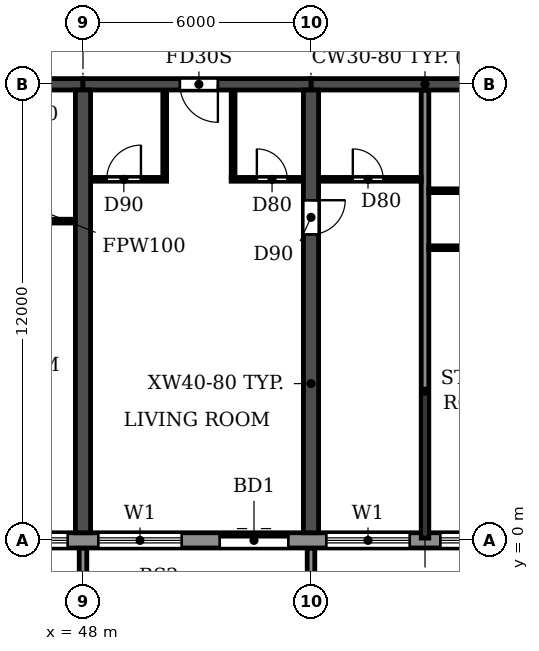
"""IFC4 building model, lengths in metres.
Left out: names, types, materials, properties, quantities, classifications, styles, units other than length and angle.
Written with IfcOpenShell. Run it as: python <this file> out.ifc"""

import sys

from ifc_helpers import new_model, si_unit, direction, frame, frame_2d, origin, place, context, subcontext, project, spatial, polyline, rectangle, outline, extrude, source, transform, mapped, element, fill, save


model = new_model("IFC4")
c1 = context("Model", 3, precision=1e-05, world=origin(), true_north=direction((0.0, 1.0)))
c2 = subcontext(c1, "Body", "Model", "MODEL_VIEW")
j1 = project(units=[si_unit("LENGTHUNIT", "METRE"), si_unit("PLANEANGLEUNIT", "RADIAN")], contexts=[c1])
p1 = place(None, origin())
s1 = spatial("IfcSite", under=j1, at=p1, CompositionType="ELEMENT")
p2 = place(p1, origin())
s2 = spatial("IfcBuilding", under=s1, at=p2, CompositionType="ELEMENT")
p3 = place(p2, frame((0.0, 0.0, 49.8)))
s3 = spatial("IfcBuildingStorey", under=s2, at=p3, CompositionType="ELEMENT", Elevation=49.8)
p4 = place(p3, frame((48.0, 0.2, 0.0), z_axis=(0.0, 0.0, 1.0), x_axis=(0.0, 1.0, 0.0)))
e1 = element("IfcWall", 1, at=p4, inside=s3, PredefinedType="SHEAR", context=c2, shape_type="SweptSolid", body=[
    extrude(rectangle(XDim=11.65, YDim=0.4, at=frame_2d((5.825, 0.0))), origin(), (0.0, 0.0, 1.0), 3.0),
])
p5 = place(p3, frame((54.0, 0.2, 0.0), z_axis=(0.0, 0.0, 1.0), x_axis=(0.0, 1.0, 0.0)))
e2 = element("IfcWall", 2, at=p5, inside=s3, PredefinedType="SHEAR", context=c2, shape_type="SweptSolid", body=[
    extrude(rectangle(XDim=11.65, YDim=0.4, at=frame_2d((5.825, 0.0))), origin(), (0.0, 0.0, 1.0), 3.0),
])
p6 = place(p5, frame((7.85, 0.0, 0.0)))
e3 = element("IfcOpeningElement", 3, at=p6, cuts=e2, PredefinedType="OPENING", context=c2, shape_type="SweptSolid", body=[
    extrude(rectangle(XDim=0.9, YDim=2.1, at=frame_2d((0.45, 1.05))), frame((0.0, 0.21, 0.0), z_axis=(0.0, -1.0, 0.0), x_axis=(1.0, 0.0, 0.0)), (0.0, 0.0, 1.0), 0.42),
])
p7 = place(p3, frame((42.0, 12.0, 0.0), z_axis=(0.0, 0.0, 1.0), x_axis=(1.0, 0.0, 0.0)))
e4 = element("IfcWall", 4, at=p7, inside=s3, PredefinedType="SHEAR", context=c2, shape_type="SweptSolid", body=[
    extrude(rectangle(XDim=6.0, YDim=0.3, at=frame_2d((3.0, 0.0))), origin(), (0.0, 0.0, 1.0), 2.4),
])
p8 = place(p7, frame((2.45, 0.0, 0.0)))
e5 = element("IfcOpeningElement", 5, at=p8, cuts=e4, PredefinedType="OPENING", context=c2, shape_type="SweptSolid", body=[
    extrude(rectangle(XDim=1.0, YDim=2.1, at=frame_2d((0.5, 1.05))), frame((0.0, 0.16, 0.0), z_axis=(0.0, -1.0, 0.0), x_axis=(1.0, 0.0, 0.0)), (0.0, 0.0, 1.0), 0.32),
])
p9 = place(p3, frame((48.0, 12.0, 0.0), z_axis=(0.0, 0.0, 1.0), x_axis=(1.0, 0.0, 0.0)))
e6 = element("IfcWall", 6, at=p9, inside=s3, PredefinedType="SHEAR", context=c2, shape_type="SweptSolid", body=[
    extrude(rectangle(XDim=6.0, YDim=0.3, at=frame_2d((3.0, 0.0))), origin(), (0.0, 0.0, 1.0), 2.4),
])
p10 = place(p9, frame((2.55, 0.0, 0.0)))
e7 = element("IfcOpeningElement", 7, at=p10, cuts=e6, PredefinedType="OPENING", context=c2, shape_type="SweptSolid", body=[
    extrude(rectangle(XDim=1.0, YDim=2.1, at=frame_2d((0.5, 1.05))), frame((0.0, 0.16, 0.0), z_axis=(0.0, -1.0, 0.0), x_axis=(1.0, 0.0, 0.0)), (0.0, 0.0, 1.0), 0.32),
])
p11 = place(p3, frame((54.0, 12.0, 0.0), z_axis=(0.0, 0.0, 1.0), x_axis=(1.0, 0.0, 0.0)))
e8 = element("IfcWall", 8, at=p11, inside=s3, PredefinedType="SHEAR", context=c2, shape_type="SweptSolid", body=[
    extrude(rectangle(XDim=6.0, YDim=0.3, at=frame_2d((3.0, 0.0))), origin(), (0.0, 0.0, 1.0), 2.4),
])
p12 = place(p3, frame((4.683, 0.0, 0.0), z_axis=(0.0, 0.0, 1.0), x_axis=(1.0, 0.0, 0.0)))
e9 = element("IfcWall", 9, at=p12, inside=s3, PredefinedType="STANDARD", context=c2, shape_type="SweptSolid", body=[
    extrude(rectangle(XDim=92.634, YDim=0.4, at=frame_2d((46.317, 0.0))), origin(), (0.0, 0.0, 1.0), 3.0),
])
p13 = place(p12, frame((1.717, 0.0, 0.9)))
e10 = element("IfcOpeningElement", 10, at=p13, cuts=e9, PredefinedType="OPENING", context=c2, shape_type="SweptSolid", body=[
    extrude(rectangle(XDim=2.2, YDim=1.5, at=frame_2d((1.1, 0.75))), frame((0.0, 0.21, 0.0), z_axis=(0.0, -1.0, 0.0), x_axis=(1.0, 0.0, 0.0)), (0.0, 0.0, 1.0), 0.42),
])
p14 = place(p12, frame((4.717, 0.0, 0.9)))
e11 = element("IfcOpeningElement", 11, at=p14, cuts=e9, PredefinedType="OPENING", context=c2, shape_type="SweptSolid", body=[
    extrude(rectangle(XDim=2.2, YDim=1.5, at=frame_2d((1.1, 0.75))), frame((0.0, 0.21, 0.0), z_axis=(0.0, -1.0, 0.0), x_axis=(1.0, 0.0, 0.0)), (0.0, 0.0, 1.0), 0.42),
])
p15 = place(p12, frame((7.717, 0.0, 0.9)))
e12 = element("IfcOpeningElement", 12, at=p15, cuts=e9, PredefinedType="OPENING", context=c2, shape_type="SweptSolid", body=[
    extrude(rectangle(XDim=2.2, YDim=1.5, at=frame_2d((1.1, 0.75))), frame((0.0, 0.21, 0.0), z_axis=(0.0, -1.0, 0.0), x_axis=(1.0, 0.0, 0.0)), (0.0, 0.0, 1.0), 0.42),
])
p16 = place(p12, frame((10.917, 0.0, 0.0)))
e13 = element("IfcOpeningElement", 13, at=p16, cuts=e9, PredefinedType="OPENING", context=c2, shape_type="SweptSolid", body=[
    extrude(rectangle(XDim=1.8, YDim=2.4, at=frame_2d((0.9, 1.2))), frame((0.0, 0.21, 0.0), z_axis=(0.0, -1.0, 0.0), x_axis=(1.0, 0.0, 0.0)), (0.0, 0.0, 1.0), 0.42),
])
p17 = place(p12, frame((13.717, 0.0, 0.9)))
e14 = element("IfcOpeningElement", 14, at=p17, cuts=e9, PredefinedType="OPENING", context=c2, shape_type="SweptSolid", body=[
    extrude(rectangle(XDim=2.2, YDim=1.5, at=frame_2d((1.1, 0.75))), frame((0.0, 0.21, 0.0), z_axis=(0.0, -1.0, 0.0), x_axis=(1.0, 0.0, 0.0)), (0.0, 0.0, 1.0), 0.42),
])
p18 = place(p12, frame((16.717, 0.0, 0.9)))
e15 = element("IfcOpeningElement", 15, at=p18, cuts=e9, PredefinedType="OPENING", context=c2, shape_type="SweptSolid", body=[
    extrude(rectangle(XDim=2.2, YDim=1.5, at=frame_2d((1.1, 0.75))), frame((0.0, 0.21, 0.0), z_axis=(0.0, -1.0, 0.0), x_axis=(1.0, 0.0, 0.0)), (0.0, 0.0, 1.0), 0.42),
])
p19 = place(p12, frame((19.917, 0.0, 0.0)))
e16 = element("IfcOpeningElement", 16, at=p19, cuts=e9, PredefinedType="OPENING", context=c2, shape_type="SweptSolid", body=[
    extrude(rectangle(XDim=1.8, YDim=2.4, at=frame_2d((0.9, 1.2))), frame((0.0, 0.21, 0.0), z_axis=(0.0, -1.0, 0.0), x_axis=(1.0, 0.0, 0.0)), (0.0, 0.0, 1.0), 0.42),
])
p20 = place(p12, frame((22.717, 0.0, 0.9)))
e17 = element("IfcOpeningElement", 17, at=p20, cuts=e9, PredefinedType="OPENING", context=c2, shape_type="SweptSolid", body=[
    extrude(rectangle(XDim=2.2, YDim=1.5, at=frame_2d((1.1, 0.75))), frame((0.0, 0.21, 0.0), z_axis=(0.0, -1.0, 0.0), x_axis=(1.0, 0.0, 0.0)), (0.0, 0.0, 1.0), 0.42),
])
p21 = place(p12, frame((25.717, 0.0, 0.9)))
e18 = element("IfcOpeningElement", 18, at=p21, cuts=e9, PredefinedType="OPENING", context=c2, shape_type="SweptSolid", body=[
    extrude(rectangle(XDim=2.2, YDim=1.5, at=frame_2d((1.1, 0.75))), frame((0.0, 0.21, 0.0), z_axis=(0.0, -1.0, 0.0), x_axis=(1.0, 0.0, 0.0)), (0.0, 0.0, 1.0), 0.42),
])
p22 = place(p12, frame((28.717, 0.0, 0.9)))
e19 = element("IfcOpeningElement", 19, at=p22, cuts=e9, PredefinedType="OPENING", context=c2, shape_type="SweptSolid", body=[
    extrude(rectangle(XDim=2.2, YDim=1.5, at=frame_2d((1.1, 0.75))), frame((0.0, 0.21, 0.0), z_axis=(0.0, -1.0, 0.0), x_axis=(1.0, 0.0, 0.0)), (0.0, 0.0, 1.0), 0.42),
])
p23 = place(p12, frame((31.717, 0.0, 0.9)))
e20 = element("IfcOpeningElement", 20, at=p23, cuts=e9, PredefinedType="OPENING", context=c2, shape_type="SweptSolid", body=[
    extrude(rectangle(XDim=2.2, YDim=1.5, at=frame_2d((1.1, 0.75))), frame((0.0, 0.21, 0.0), z_axis=(0.0, -1.0, 0.0), x_axis=(1.0, 0.0, 0.0)), (0.0, 0.0, 1.0), 0.42),
])
p24 = place(p12, frame((34.917, 0.0, 0.0)))
e21 = element("IfcOpeningElement", 21, at=p24, cuts=e9, PredefinedType="OPENING", context=c2, shape_type="SweptSolid", body=[
    extrude(rectangle(XDim=1.8, YDim=2.4, at=frame_2d((0.9, 1.2))), frame((0.0, 0.21, 0.0), z_axis=(0.0, -1.0, 0.0), x_axis=(1.0, 0.0, 0.0)), (0.0, 0.0, 1.0), 0.42),
])
p25 = place(p12, frame((37.717, 0.0, 0.9)))
e22 = element("IfcOpeningElement", 22, at=p25, cuts=e9, PredefinedType="OPENING", context=c2, shape_type="SweptSolid", body=[
    extrude(rectangle(XDim=2.2, YDim=1.5, at=frame_2d((1.1, 0.75))), frame((0.0, 0.21, 0.0), z_axis=(0.0, -1.0, 0.0), x_axis=(1.0, 0.0, 0.0)), (0.0, 0.0, 1.0), 0.42),
])
p26 = place(p12, frame((40.717, 0.0, 0.9)))
e23 = element("IfcOpeningElement", 23, at=p26, cuts=e9, PredefinedType="OPENING", context=c2, shape_type="SweptSolid", body=[
    extrude(rectangle(XDim=2.2, YDim=1.5, at=frame_2d((1.1, 0.75))), frame((0.0, 0.21, 0.0), z_axis=(0.0, -1.0, 0.0), x_axis=(1.0, 0.0, 0.0)), (0.0, 0.0, 1.0), 0.42),
])
p27 = place(p12, frame((43.717, 0.0, 0.9)))
e24 = element("IfcOpeningElement", 24, at=p27, cuts=e9, PredefinedType="OPENING", context=c2, shape_type="SweptSolid", body=[
    extrude(rectangle(XDim=2.2, YDim=1.5, at=frame_2d((1.1, 0.75))), frame((0.0, 0.21, 0.0), z_axis=(0.0, -1.0, 0.0), x_axis=(1.0, 0.0, 0.0)), (0.0, 0.0, 1.0), 0.42),
])
p28 = place(p12, frame((46.917, 0.0, 0.0)))
e25 = element("IfcOpeningElement", 25, at=p28, cuts=e9, PredefinedType="OPENING", context=c2, shape_type="SweptSolid", body=[
    extrude(rectangle(XDim=1.8, YDim=2.4, at=frame_2d((0.9, 1.2))), frame((0.0, 0.21, 0.0), z_axis=(0.0, -1.0, 0.0), x_axis=(1.0, 0.0, 0.0)), (0.0, 0.0, 1.0), 0.42),
])
p29 = place(p12, frame((49.717, 0.0, 0.9)))
e26 = element("IfcOpeningElement", 26, at=p29, cuts=e9, PredefinedType="OPENING", context=c2, shape_type="SweptSolid", body=[
    extrude(rectangle(XDim=2.2, YDim=1.5, at=frame_2d((1.1, 0.75))), frame((0.0, 0.21, 0.0), z_axis=(0.0, -1.0, 0.0), x_axis=(1.0, 0.0, 0.0)), (0.0, 0.0, 1.0), 0.42),
])
p30 = place(p12, frame((52.717, 0.0, 0.9)))
e27 = element("IfcOpeningElement", 27, at=p30, cuts=e9, PredefinedType="OPENING", context=c2, shape_type="SweptSolid", body=[
    extrude(rectangle(XDim=2.2, YDim=1.5, at=frame_2d((1.1, 0.75))), frame((0.0, 0.21, 0.0), z_axis=(0.0, -1.0, 0.0), x_axis=(1.0, 0.0, 0.0)), (0.0, 0.0, 1.0), 0.42),
])
p31 = place(p12, frame((55.717, 0.0, 0.9)))
e28 = element("IfcOpeningElement", 28, at=p31, cuts=e9, PredefinedType="OPENING", context=c2, shape_type="SweptSolid", body=[
    extrude(rectangle(XDim=2.2, YDim=1.5, at=frame_2d((1.1, 0.75))), frame((0.0, 0.21, 0.0), z_axis=(0.0, -1.0, 0.0), x_axis=(1.0, 0.0, 0.0)), (0.0, 0.0, 1.0), 0.42),
])
p32 = place(p12, frame((58.917, 0.0, 0.0)))
e29 = element("IfcOpeningElement", 29, at=p32, cuts=e9, PredefinedType="OPENING", context=c2, shape_type="SweptSolid", body=[
    extrude(rectangle(XDim=1.8, YDim=2.4, at=frame_2d((0.9, 1.2))), frame((0.0, 0.21, 0.0), z_axis=(0.0, -1.0, 0.0), x_axis=(1.0, 0.0, 0.0)), (0.0, 0.0, 1.0), 0.42),
])
p33 = place(p12, frame((61.717, 0.0, 0.9)))
e30 = element("IfcOpeningElement", 30, at=p33, cuts=e9, PredefinedType="OPENING", context=c2, shape_type="SweptSolid", body=[
    extrude(rectangle(XDim=2.2, YDim=1.5, at=frame_2d((1.1, 0.75))), frame((0.0, 0.21, 0.0), z_axis=(0.0, -1.0, 0.0), x_axis=(1.0, 0.0, 0.0)), (0.0, 0.0, 1.0), 0.42),
])
p34 = place(p12, frame((64.717, 0.0, 0.9)))
e31 = element("IfcOpeningElement", 31, at=p34, cuts=e9, PredefinedType="OPENING", context=c2, shape_type="SweptSolid", body=[
    extrude(rectangle(XDim=2.2, YDim=1.5, at=frame_2d((1.1, 0.75))), frame((0.0, 0.21, 0.0), z_axis=(0.0, -1.0, 0.0), x_axis=(1.0, 0.0, 0.0)), (0.0, 0.0, 1.0), 0.42),
])
p35 = place(p12, frame((67.717, 0.0, 0.9)))
e32 = element("IfcOpeningElement", 32, at=p35, cuts=e9, PredefinedType="OPENING", context=c2, shape_type="SweptSolid", body=[
    extrude(rectangle(XDim=2.2, YDim=1.5, at=frame_2d((1.1, 0.75))), frame((0.0, 0.21, 0.0), z_axis=(0.0, -1.0, 0.0), x_axis=(1.0, 0.0, 0.0)), (0.0, 0.0, 1.0), 0.42),
])
p36 = place(p12, frame((70.917, 0.0, 0.0)))
e33 = element("IfcOpeningElement", 33, at=p36, cuts=e9, PredefinedType="OPENING", context=c2, shape_type="SweptSolid", body=[
    extrude(rectangle(XDim=1.8, YDim=2.4, at=frame_2d((0.9, 1.2))), frame((0.0, 0.21, 0.0), z_axis=(0.0, -1.0, 0.0), x_axis=(1.0, 0.0, 0.0)), (0.0, 0.0, 1.0), 0.42),
])
p37 = place(p12, frame((73.717, 0.0, 0.9)))
e34 = element("IfcOpeningElement", 34, at=p37, cuts=e9, PredefinedType="OPENING", context=c2, shape_type="SweptSolid", body=[
    extrude(rectangle(XDim=2.2, YDim=1.5, at=frame_2d((1.1, 0.75))), frame((0.0, 0.21, 0.0), z_axis=(0.0, -1.0, 0.0), x_axis=(1.0, 0.0, 0.0)), (0.0, 0.0, 1.0), 0.42),
])
p38 = place(p12, frame((76.717, 0.0, 0.9)))
e35 = element("IfcOpeningElement", 35, at=p38, cuts=e9, PredefinedType="OPENING", context=c2, shape_type="SweptSolid", body=[
    extrude(rectangle(XDim=2.2, YDim=1.5, at=frame_2d((1.1, 0.75))), frame((0.0, 0.21, 0.0), z_axis=(0.0, -1.0, 0.0), x_axis=(1.0, 0.0, 0.0)), (0.0, 0.0, 1.0), 0.42),
])
p39 = place(p12, frame((79.717, 0.0, 0.9)))
e36 = element("IfcOpeningElement", 36, at=p39, cuts=e9, PredefinedType="OPENING", context=c2, shape_type="SweptSolid", body=[
    extrude(rectangle(XDim=2.2, YDim=1.5, at=frame_2d((1.1, 0.75))), frame((0.0, 0.21, 0.0), z_axis=(0.0, -1.0, 0.0), x_axis=(1.0, 0.0, 0.0)), (0.0, 0.0, 1.0), 0.42),
])
p40 = place(p12, frame((82.917, 0.0, 0.0)))
e37 = element("IfcOpeningElement", 37, at=p40, cuts=e9, PredefinedType="OPENING", context=c2, shape_type="SweptSolid", body=[
    extrude(rectangle(XDim=1.8, YDim=2.4, at=frame_2d((0.9, 1.2))), frame((0.0, 0.21, 0.0), z_axis=(0.0, -1.0, 0.0), x_axis=(1.0, 0.0, 0.0)), (0.0, 0.0, 1.0), 0.42),
])
p41 = place(p12, frame((85.717, 0.0, 0.9)))
e38 = element("IfcOpeningElement", 38, at=p41, cuts=e9, PredefinedType="OPENING", context=c2, shape_type="SweptSolid", body=[
    extrude(rectangle(XDim=2.2, YDim=1.5, at=frame_2d((1.1, 0.75))), frame((0.0, 0.21, 0.0), z_axis=(0.0, -1.0, 0.0), x_axis=(1.0, 0.0, 0.0)), (0.0, 0.0, 1.0), 0.42),
])
p42 = place(p12, frame((88.717, 0.0, 0.9)))
e39 = element("IfcOpeningElement", 39, at=p42, cuts=e9, PredefinedType="OPENING", context=c2, shape_type="SweptSolid", body=[
    extrude(rectangle(XDim=2.2, YDim=1.5, at=frame_2d((1.1, 0.75))), frame((0.0, 0.21, 0.0), z_axis=(0.0, -1.0, 0.0), x_axis=(1.0, 0.0, 0.0)), (0.0, 0.0, 1.0), 0.42),
])
m1 = source(origin(), c2, "Body", "SweptSolid", [
    extrude(outline(polyline([(0.0, 0.0), (0.2, 0.0), (0.2, 1.65), (0.0, 1.65), (0.0, 0.0)])), origin(), (0.0, 0.0, 1.0), 3.1),
])
for number, where in (
    (40, (47.9, -1.85, 0.0)),
    (41, (53.9, -1.85, 0.0)),
):
    element("IfcWall", number, at=place(p3, frame(where)), inside=s3, PredefinedType="STANDARD", context=c2, shape_type="MappedRepresentation", body=[
        mapped(m1, transform((0.0, 0.0, 0.0))),
    ])
p43 = place(p3, frame((57.0, 0.06, 0.0), z_axis=(0.0, 0.0, 1.0), x_axis=(0.0, 1.0, 0.0)))
e42 = element("IfcWall", 42, at=p43, inside=s3, PredefinedType="PARTITIONING", context=c2, shape_type="SweptSolid", body=[
    extrude(rectangle(XDim=11.78, YDim=0.2, at=frame_2d((5.89, 0.0))), origin(), (0.0, 0.0, 1.0), 3.0),
])
p44 = place(p3, frame((57.1, 7.7, 0.0), z_axis=(0.0, 0.0, 1.0), x_axis=(1.0, 0.0, 0.0)))
e43 = element("IfcWall", 43, at=p44, inside=s3, PredefinedType="PARTITIONING", context=c2, shape_type="SweptSolid", body=[
    extrude(rectangle(XDim=2.69, YDim=0.1, at=frame_2d((1.345, 0.0))), origin(), (0.0, 0.0, 1.0), 3.0),
])
p45 = place(p44, frame((1.5, 0.0, 0.0)))
e44 = element("IfcOpeningElement", 44, at=p45, cuts=e43, PredefinedType="OPENING", context=c2, shape_type="SweptSolid", body=[
    extrude(rectangle(XDim=0.9, YDim=2.1, at=frame_2d((0.45, 1.05))), frame((0.0, 0.06, 0.0), z_axis=(0.0, -1.0, 0.0), x_axis=(1.0, 0.0, 0.0)), (0.0, 0.0, 1.0), 0.12),
])
p46 = place(p3, frame((45.8, 8.4, 0.0), z_axis=(0.0, 0.0, 1.0), x_axis=(1.0, 0.0, 0.0)))
e45 = element("IfcWall", 45, at=p46, inside=s3, PredefinedType="PARTITIONING", context=c2, shape_type="SweptSolid", body=[
    extrude(rectangle(XDim=1.99, YDim=0.1, at=frame_2d((0.995, 0.0))), origin(), (0.0, 0.0, 1.0), 3.0),
])
p47 = place(p3, frame((57.1, 9.2, 0.0), z_axis=(0.0, 0.0, 1.0), x_axis=(1.0, 0.0, 0.0)))
e46 = element("IfcWall", 46, at=p47, inside=s3, PredefinedType="PARTITIONING", context=c2, shape_type="SweptSolid", body=[
    extrude(rectangle(XDim=2.69, YDim=0.1, at=frame_2d((1.345, 0.0))), origin(), (0.0, 0.0, 1.0), 3.0),
])
p48 = place(p47, frame((1.0, 0.0, 0.0)))
e47 = element("IfcOpeningElement", 47, at=p48, cuts=e46, PredefinedType="OPENING", context=c2, shape_type="SweptSolid", body=[
    extrude(rectangle(XDim=0.8, YDim=2.1, at=frame_2d((0.4, 1.05))), frame((0.0, 0.06, 0.0), z_axis=(0.0, -1.0, 0.0), x_axis=(1.0, 0.0, 0.0)), (0.0, 0.0, 1.0), 0.12),
])
p49 = place(p3, frame((48.21, 9.5, 0.0), z_axis=(0.0, 0.0, 1.0), x_axis=(1.0, 0.0, 0.0)))
e48 = element("IfcWall", 48, at=p49, inside=s3, PredefinedType="PARTITIONING", context=c2, shape_type="SweptSolid", body=[
    extrude(rectangle(XDim=1.99, YDim=0.1, at=frame_2d((0.995, 0.0))), origin(), (0.0, 0.0, 1.0), 3.0),
])
p50 = place(p49, frame((0.415, 0.0, 0.0)))
e49 = element("IfcOpeningElement", 49, at=p50, cuts=e48, PredefinedType="OPENING", context=c2, shape_type="SweptSolid", body=[
    extrude(rectangle(XDim=0.9, YDim=2.1, at=frame_2d((0.45, 1.05))), frame((0.0, 0.06, 0.0), z_axis=(0.0, -1.0, 0.0), x_axis=(1.0, 0.0, 0.0)), (0.0, 0.0, 1.0), 0.12),
])
p51 = place(p3, frame((51.9, 9.5, 0.0), z_axis=(0.0, 0.0, 1.0), x_axis=(1.0, 0.0, 0.0)))
e50 = element("IfcWall", 50, at=p51, inside=s3, PredefinedType="PARTITIONING", context=c2, shape_type="SweptSolid", body=[
    extrude(rectangle(XDim=1.89, YDim=0.1, at=frame_2d((0.945, 0.0))), origin(), (0.0, 0.0, 1.0), 3.0),
])
p52 = place(p51, frame((0.675, 0.0, 0.0)))
e51 = element("IfcOpeningElement", 51, at=p52, cuts=e50, PredefinedType="OPENING", context=c2, shape_type="SweptSolid", body=[
    extrude(rectangle(XDim=0.8, YDim=2.1, at=frame_2d((0.4, 1.05))), frame((0.0, 0.06, 0.0), z_axis=(0.0, -1.0, 0.0), x_axis=(1.0, 0.0, 0.0)), (0.0, 0.0, 1.0), 0.12),
])
p53 = place(p3, frame((54.21, 9.5, 0.0), z_axis=(0.0, 0.0, 1.0), x_axis=(1.0, 0.0, 0.0)))
e52 = element("IfcWall", 52, at=p53, inside=s3, PredefinedType="PARTITIONING", context=c2, shape_type="SweptSolid", body=[
    extrude(rectangle(XDim=2.69, YDim=0.1, at=frame_2d((1.345, 0.0))), origin(), (0.0, 0.0, 1.0), 3.0),
])
p54 = place(p53, frame((0.89, 0.0, 0.0)))
e53 = element("IfcOpeningElement", 53, at=p54, cuts=e52, PredefinedType="OPENING", context=c2, shape_type="SweptSolid", body=[
    extrude(rectangle(XDim=0.8, YDim=2.1, at=frame_2d((0.4, 1.05))), frame((0.0, 0.06, 0.0), z_axis=(0.0, -1.0, 0.0), x_axis=(1.0, 0.0, 0.0)), (0.0, 0.0, 1.0), 0.12),
])
for number, where, z_axis, x_axis in (
    (54, (50.15, 9.55, 0.0), (0.0, 0.0, 1.0), (0.0, 1.0, 0.0)),
    (55, (51.95, 9.55, 0.0), (0.0, 0.0, 1.0), (0.0, 1.0, 0.0)),
):
    element("IfcWall", number, at=place(p3, frame(where, z_axis=z_axis, x_axis=x_axis)), inside=s3, PredefinedType="PARTITIONING", context=c2, shape_type="SweptSolid", body=[
        extrude(rectangle(XDim=2.29, YDim=0.1, at=frame_2d((1.145, 0.0))), origin(), (0.0, 0.0, 1.0), 3.0),
    ])
p55 = place(p26, origin())
e56 = element("IfcWindow", 56, at=p55, inside=s3, PartitioningType="DOUBLE_PANEL_HORIZONTAL", PredefinedType="WINDOW", context=c2, shape_type="SweptSolid", body=[
    extrude(rectangle(XDim=2.2, YDim=1.5, at=frame_2d((1.1, 0.75))), frame((0.0, 0.03, 0.0), z_axis=(0.0, -1.0, 0.0), x_axis=(1.0, 0.0, 0.0)), (0.0, 0.0, 1.0), 0.06),
])
fill(e23, e56)
p56 = place(p27, origin())
e57 = element("IfcWindow", 57, at=p56, inside=s3, PartitioningType="DOUBLE_PANEL_HORIZONTAL", PredefinedType="WINDOW", context=c2, shape_type="SweptSolid", body=[
    extrude(rectangle(XDim=2.2, YDim=1.5, at=frame_2d((1.1, 0.75))), frame((0.0, 0.03, 0.0), z_axis=(0.0, -1.0, 0.0), x_axis=(1.0, 0.0, 0.0)), (0.0, 0.0, 1.0), 0.06),
])
fill(e24, e57)
p57 = place(p28, origin())
e58 = element("IfcDoor", 58, at=p57, inside=s3, OperationType="DOUBLE_DOOR_SLIDING", PredefinedType="DOOR", context=c2, shape_type="SweptSolid", body=[
    extrude(rectangle(XDim=1.8, YDim=2.4, at=frame_2d((0.9, 1.2))), frame((0.0, 0.025, 0.0), z_axis=(0.0, -1.0, 0.0), x_axis=(1.0, 0.0, 0.0)), (0.0, 0.0, 1.0), 0.05),
])
fill(e25, e58)
p58 = place(p29, origin())
e59 = element("IfcWindow", 59, at=p58, inside=s3, PartitioningType="DOUBLE_PANEL_HORIZONTAL", PredefinedType="WINDOW", context=c2, shape_type="SweptSolid", body=[
    extrude(rectangle(XDim=2.2, YDim=1.5, at=frame_2d((1.1, 0.75))), frame((0.0, 0.03, 0.0), z_axis=(0.0, -1.0, 0.0), x_axis=(1.0, 0.0, 0.0)), (0.0, 0.0, 1.0), 0.06),
])
fill(e26, e59)
p59 = place(p30, origin())
e60 = element("IfcWindow", 60, at=p59, inside=s3, PartitioningType="DOUBLE_PANEL_HORIZONTAL", PredefinedType="WINDOW", context=c2, shape_type="SweptSolid", body=[
    extrude(rectangle(XDim=2.2, YDim=1.5, at=frame_2d((1.1, 0.75))), frame((0.0, 0.03, 0.0), z_axis=(0.0, -1.0, 0.0), x_axis=(1.0, 0.0, 0.0)), (0.0, 0.0, 1.0), 0.06),
])
fill(e27, e60)
p60 = place(p54, origin())
e61 = element("IfcDoor", 61, at=p60, inside=s3, OperationType="SINGLE_SWING_LEFT", PredefinedType="DOOR", context=c2, shape_type="SweptSolid", body=[
    extrude(rectangle(XDim=0.8, YDim=2.1, at=frame_2d((0.4, 1.05))), frame((0.0, 0.025, 0.0), z_axis=(0.0, -1.0, 0.0), x_axis=(1.0, 0.0, 0.0)), (0.0, 0.0, 1.0), 0.05),
])
fill(e53, e61)
p61 = place(p50, origin())
e62 = element("IfcDoor", 62, at=p61, inside=s3, OperationType="SINGLE_SWING_RIGHT", PredefinedType="DOOR", context=c2, shape_type="SweptSolid", body=[
    extrude(rectangle(XDim=0.9, YDim=2.1, at=frame_2d((0.45, 1.05))), frame((0.0, 0.025, 0.0), z_axis=(0.0, -1.0, 0.0), x_axis=(1.0, 0.0, 0.0)), (0.0, 0.0, 1.0), 0.05),
])
fill(e49, e62)
p62 = place(p10, frame((1.0, 0.0, 0.0), z_axis=(0.0, 0.0, 1.0), x_axis=(-1.0, 0.0, 0.0)))
e63 = element("IfcDoor", 63, at=p62, inside=s3, OperationType="SINGLE_SWING_LEFT", PredefinedType="DOOR", context=c2, shape_type="SweptSolid", body=[
    extrude(rectangle(XDim=1.0, YDim=2.1, at=frame_2d((0.5, 1.05))), frame((0.0, 0.025, 0.0), z_axis=(0.0, -1.0, 0.0), x_axis=(1.0, 0.0, 0.0)), (0.0, 0.0, 1.0), 0.05),
])
fill(e7, e63)
p63 = place(p52, origin())
e64 = element("IfcDoor", 64, at=p63, inside=s3, OperationType="SINGLE_SWING_LEFT", PredefinedType="DOOR", context=c2, shape_type="SweptSolid", body=[
    extrude(rectangle(XDim=0.8, YDim=2.1, at=frame_2d((0.4, 1.05))), frame((0.0, 0.025, 0.0), z_axis=(0.0, -1.0, 0.0), x_axis=(1.0, 0.0, 0.0)), (0.0, 0.0, 1.0), 0.05),
])
fill(e51, e64)
p64 = place(p6, frame((0.9, 0.0, 0.0), z_axis=(0.0, 0.0, 1.0), x_axis=(-1.0, 0.0, 0.0)))
e65 = element("IfcDoor", 65, at=p64, inside=s3, OperationType="SINGLE_SWING_LEFT", PredefinedType="DOOR", context=c2, shape_type="SweptSolid", body=[
    extrude(rectangle(XDim=0.9, YDim=2.1, at=frame_2d((0.45, 1.05))), frame((0.0, 0.025, 0.0), z_axis=(0.0, -1.0, 0.0), x_axis=(1.0, 0.0, 0.0)), (0.0, 0.0, 1.0), 0.05),
])
fill(e3, e65)
save(model, sys.argv[1])
